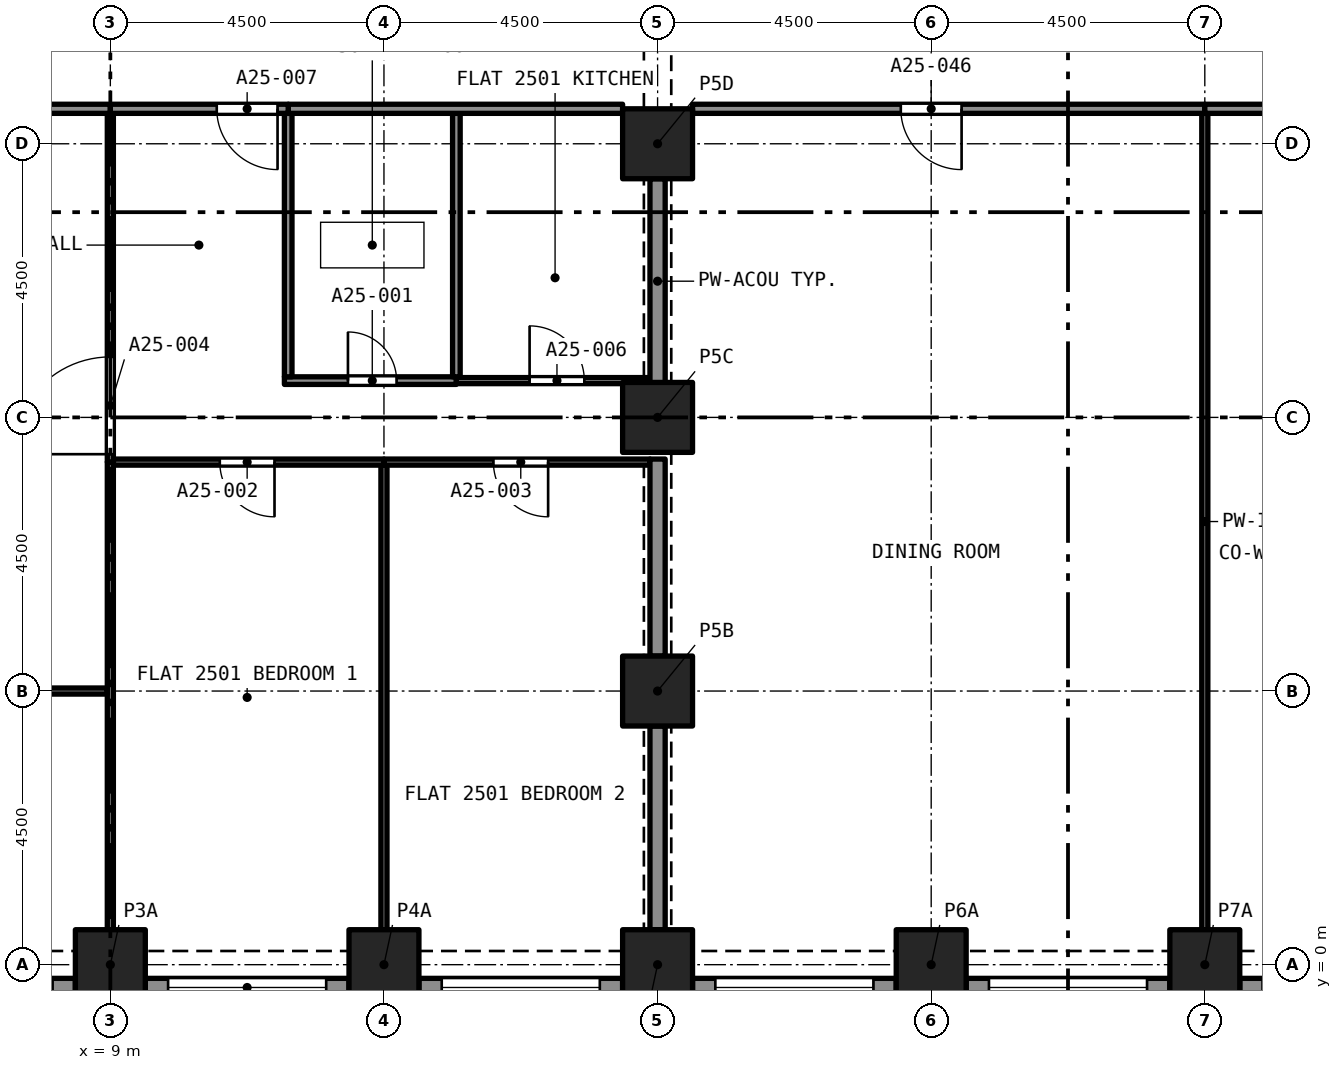
"""IFC4 building model, lengths in metres.
Left out: names, types, materials, properties, quantities, classifications, styles, units other than length and angle.
Written with IfcOpenShell. Run it as: python <this file> out.ifc"""

import sys

from ifc_helpers import new_model, si_unit, direction, frame, frame_2d, origin, origin_2d, place, context, subcontext, project, spatial, rectangle, extrude, element, fill, save


model = new_model("IFC4")
c1 = context("Model", 3, precision=1e-05, world=origin(), true_north=direction((0.0, 1.0)))
c2 = subcontext(c1, "Body", "Model", "MODEL_VIEW")
j1 = project(units=[si_unit("LENGTHUNIT", "METRE"), si_unit("PLANEANGLEUNIT", "RADIAN")], contexts=[c1])
p1 = place(None, origin())
s1 = spatial("IfcSite", under=j1, at=p1, CompositionType="ELEMENT")
p2 = place(p1, origin())
s2 = spatial("IfcBuilding", under=s1, at=p2, CompositionType="ELEMENT")
p3 = place(p2, frame((0.0, 0.0, 92.8)))
s3 = spatial("IfcBuildingStorey", under=s2, at=p3, CompositionType="ELEMENT", Elevation=92.8)
for number, where, z_axis, x_axis in (
    (1, (9.0, 0.0, 0.0), (0.0, 0.0, 1.0), (1.0, 0.0, 0.0)),
    (2, (13.5, 0.0, 0.0), (0.0, 0.0, 1.0), (1.0, 0.0, 0.0)),
    (3, (18.0, 0.0, 0.0), (0.0, 0.0, 1.0), (1.0, 0.0, 0.0)),
    (4, (22.5, 0.0, 0.0), (0.0, 0.0, 1.0), (1.0, 0.0, 0.0)),
    (5, (27.0, 0.0, 0.0), (0.0, 0.0, 1.0), (1.0, 0.0, 0.0)),
    (6, (18.0, 4.5, 0.0), (0.0, 0.0, 1.0), (1.0, 0.0, 0.0)),
    (7, (18.0, 9.0, 0.0), (0.0, 0.0, 1.0), (1.0, 0.0, 0.0)),
    (8, (18.0, 13.5, 0.0), (0.0, 0.0, 1.0), (1.0, 0.0, 0.0)),
):
    element("IfcColumn", number, at=place(p3, frame(where, z_axis=z_axis, x_axis=x_axis)), inside=s3, PredefinedType="COLUMN", context=c2, shape_type="SweptSolid", body=[
        extrude(rectangle(XDim=1.15, YDim=1.15, at=origin_2d()), origin(), (0.0, 0.0, 1.0), 3.2),
    ])
p4 = place(p3, frame((8.425, -0.375, 0.0), z_axis=(0.0, 0.0, 1.0), x_axis=(-1.0, 0.0, 0.0)))
e9 = element("IfcWall", 9, at=p4, inside=s3, PredefinedType="SOLIDWALL", context=c2, shape_type="SweptSolid", body=[
    extrude(rectangle(XDim=3.35, YDim=0.3, at=frame_2d((1.675, 0.0))), origin(), (0.0, 0.0, 1.0), 3.2),
])
p5 = place(p4, frame((0.375, 0.0, 0.45)))
e10 = element("IfcOpeningElement", 10, at=p5, cuts=e9, PredefinedType="OPENING", context=c2, shape_type="SweptSolid", body=[
    extrude(rectangle(XDim=2.6, YDim=1.95, at=frame_2d((1.3, 0.975))), frame((0.0, 0.16, 0.0), z_axis=(0.0, -1.0, 0.0), x_axis=(1.0, 0.0, 0.0)), (0.0, 0.0, 1.0), 0.32),
])
p6 = place(p3, frame((12.925, -0.375, 0.0), z_axis=(0.0, 0.0, 1.0), x_axis=(-1.0, 0.0, 0.0)))
e11 = element("IfcWall", 11, at=p6, inside=s3, PredefinedType="SOLIDWALL", context=c2, shape_type="SweptSolid", body=[
    extrude(rectangle(XDim=3.35, YDim=0.3, at=frame_2d((1.675, 0.0))), origin(), (0.0, 0.0, 1.0), 3.2),
])
p7 = place(p6, frame((0.375, 0.0, 0.45)))
e12 = element("IfcOpeningElement", 12, at=p7, cuts=e11, PredefinedType="OPENING", context=c2, shape_type="SweptSolid", body=[
    extrude(rectangle(XDim=2.6, YDim=1.95, at=frame_2d((1.3, 0.975))), frame((0.0, 0.16, 0.0), z_axis=(0.0, -1.0, 0.0), x_axis=(1.0, 0.0, 0.0)), (0.0, 0.0, 1.0), 0.32),
])
p8 = place(p3, frame((17.425, -0.375, 0.0), z_axis=(0.0, 0.0, 1.0), x_axis=(-1.0, 0.0, 0.0)))
e13 = element("IfcWall", 13, at=p8, inside=s3, PredefinedType="SOLIDWALL", context=c2, shape_type="SweptSolid", body=[
    extrude(rectangle(XDim=3.35, YDim=0.3, at=frame_2d((1.675, 0.0))), origin(), (0.0, 0.0, 1.0), 3.2),
])
p9 = place(p8, frame((0.375, 0.0, 0.45)))
e14 = element("IfcOpeningElement", 14, at=p9, cuts=e13, PredefinedType="OPENING", context=c2, shape_type="SweptSolid", body=[
    extrude(rectangle(XDim=2.6, YDim=1.95, at=frame_2d((1.3, 0.975))), frame((0.0, 0.16, 0.0), z_axis=(0.0, -1.0, 0.0), x_axis=(1.0, 0.0, 0.0)), (0.0, 0.0, 1.0), 0.32),
])
p10 = place(p3, frame((21.925, -0.375, 0.0), z_axis=(0.0, 0.0, 1.0), x_axis=(-1.0, 0.0, 0.0)))
e15 = element("IfcWall", 15, at=p10, inside=s3, PredefinedType="SOLIDWALL", context=c2, shape_type="SweptSolid", body=[
    extrude(rectangle(XDim=3.35, YDim=0.3, at=frame_2d((1.675, 0.0))), origin(), (0.0, 0.0, 1.0), 3.2),
])
p11 = place(p10, frame((0.375, 0.0, 0.45)))
e16 = element("IfcOpeningElement", 16, at=p11, cuts=e15, PredefinedType="OPENING", context=c2, shape_type="SweptSolid", body=[
    extrude(rectangle(XDim=2.6, YDim=1.95, at=frame_2d((1.3, 0.975))), frame((0.0, 0.16, 0.0), z_axis=(0.0, -1.0, 0.0), x_axis=(1.0, 0.0, 0.0)), (0.0, 0.0, 1.0), 0.32),
])
p12 = place(p3, frame((26.425, -0.375, 0.0), z_axis=(0.0, 0.0, 1.0), x_axis=(-1.0, 0.0, 0.0)))
e17 = element("IfcWall", 17, at=p12, inside=s3, PredefinedType="SOLIDWALL", context=c2, shape_type="SweptSolid", body=[
    extrude(rectangle(XDim=3.35, YDim=0.3, at=frame_2d((1.675, 0.0))), origin(), (0.0, 0.0, 1.0), 3.2),
])
p13 = place(p12, frame((0.375, 0.0, 0.45)))
e18 = element("IfcOpeningElement", 18, at=p13, cuts=e17, PredefinedType="OPENING", context=c2, shape_type="SweptSolid", body=[
    extrude(rectangle(XDim=2.6, YDim=1.95, at=frame_2d((1.3, 0.975))), frame((0.0, 0.16, 0.0), z_axis=(0.0, -1.0, 0.0), x_axis=(1.0, 0.0, 0.0)), (0.0, 0.0, 1.0), 0.32),
])
p14 = place(p3, frame((30.925, -0.375, 0.0), z_axis=(0.0, 0.0, 1.0), x_axis=(-1.0, 0.0, 0.0)))
e19 = element("IfcWall", 19, at=p14, inside=s3, PredefinedType="SOLIDWALL", context=c2, shape_type="SweptSolid", body=[
    extrude(rectangle(XDim=3.35, YDim=0.3, at=frame_2d((1.675, 0.0))), origin(), (0.0, 0.0, 1.0), 3.2),
])
p15 = place(p14, frame((0.375, 0.0, 0.45)))
e20 = element("IfcOpeningElement", 20, at=p15, cuts=e19, PredefinedType="OPENING", context=c2, shape_type="SweptSolid", body=[
    extrude(rectangle(XDim=2.6, YDim=1.95, at=frame_2d((1.3, 0.975))), frame((0.0, 0.16, 0.0), z_axis=(0.0, -1.0, 0.0), x_axis=(1.0, 0.0, 0.0)), (0.0, 0.0, 1.0), 0.32),
])
p16 = place(p3, frame((11.863, 9.605, 0.0), z_axis=(0.0, 0.0, 1.0), x_axis=(1.0, 0.0, 0.0)))
e21 = element("IfcWall", 21, at=p16, inside=s3, PredefinedType="PARTITIONING", context=c2, shape_type="SweptSolid", body=[
    extrude(rectangle(XDim=2.828, YDim=0.125, at=frame_2d((1.414, 0.0))), origin(), (0.0, 0.0, 1.0), 2.9),
])
p17 = place(p16, frame((1.045, 0.0, 0.0)))
e22 = element("IfcOpeningElement", 22, at=p17, cuts=e21, PredefinedType="OPENING", context=c2, shape_type="SweptSolid", body=[
    extrude(rectangle(XDim=0.8, YDim=2.1, at=frame_2d((0.4, 1.05))), frame((0.0, 0.073, 0.0), z_axis=(0.0, -1.0, 0.0), x_axis=(1.0, 0.0, 0.0)), (0.0, 0.0, 1.0), 0.145),
])
for number, where, z_axis, x_axis in (
    (23, (11.925, 9.667, 0.0), (0.0, 0.0, 1.0), (0.0, 1.0, 0.0)),
    (24, (14.691, 9.667, 0.0), (0.0, 0.0, 1.0), (0.0, 1.0, 0.0)),
):
    element("IfcWall", number, at=place(p3, frame(where, z_axis=z_axis, x_axis=x_axis)), inside=s3, PredefinedType="PARTITIONING", context=c2, shape_type="SweptSolid", body=[
        extrude(rectangle(XDim=4.333, YDim=0.125, at=frame_2d((2.166, 0.0))), origin(), (0.0, 0.0, 1.0), 2.9),
    ])
p18 = place(p3, frame((11.925, 14.075, 0.0), z_axis=(0.0, 0.0, 1.0), x_axis=(1.0, 0.0, 0.0)))
e25 = element("IfcWall", 25, at=p18, inside=s3, PredefinedType="PARTITIONING", context=c2, shape_type="SweptSolid", body=[
    extrude(rectangle(XDim=5.5, YDim=0.15, at=frame_2d((2.75, 0.0))), origin(), (0.0, 0.0, 1.0), 2.9),
])
p19 = place(p3, frame((13.5, 0.575, 0.0), z_axis=(0.0, 0.0, 1.0), x_axis=(0.0, 1.0, 0.0)))
e26 = element("IfcWall", 26, at=p19, inside=s3, PredefinedType="PARTITIONING", context=c2, shape_type="SweptSolid", body=[
    extrude(rectangle(XDim=7.64, YDim=0.1, at=frame_2d((3.82, 0.0))), origin(), (0.0, 0.0, 1.0), 2.9),
])
p20 = place(p3, frame((13.5, 8.265, 0.0), z_axis=(0.0, 0.0, 1.0), x_axis=(-1.0, 0.0, 0.0)))
e27 = element("IfcWall", 27, at=p20, inside=s3, PredefinedType="PARTITIONING", context=c2, shape_type="SweptSolid", body=[
    extrude(rectangle(XDim=4.45, YDim=0.1, at=frame_2d((2.225, 0.0))), origin(), (0.0, 0.0, 1.0), 2.9),
])
p21 = place(p20, frame((1.8, 0.0, 0.0)))
e28 = element("IfcOpeningElement", 28, at=p21, cuts=e27, PredefinedType="OPENING", context=c2, shape_type="SweptSolid", body=[
    extrude(rectangle(XDim=0.9, YDim=2.1, at=frame_2d((0.45, 1.05))), frame((0.0, 0.06, 0.0), z_axis=(0.0, -1.0, 0.0), x_axis=(1.0, 0.0, 0.0)), (0.0, 0.0, 1.0), 0.12),
])
p22 = place(p3, frame((9.0, 0.575, 0.0), z_axis=(0.0, 0.0, 1.0), x_axis=(0.0, 1.0, 0.0)))
e29 = element("IfcWall", 29, at=p22, inside=s3, PredefinedType="PARTITIONING", context=c2, shape_type="SweptSolid", body=[
    extrude(rectangle(XDim=7.69, YDim=0.1, at=frame_2d((3.845, 0.0))), origin(), (0.0, 0.0, 1.0), 2.9),
])
p23 = place(p3, frame((17.875, 8.265, 0.0), z_axis=(0.0, 0.0, 1.0), x_axis=(-1.0, 0.0, 0.0)))
e30 = element("IfcWall", 30, at=p23, inside=s3, PredefinedType="PARTITIONING", context=c2, shape_type="SweptSolid", body=[
    extrude(rectangle(XDim=4.375, YDim=0.1, at=frame_2d((2.188, 0.0))), origin(), (0.0, 0.0, 1.0), 2.9),
])
p24 = place(p23, frame((1.675, 0.0, 0.0)))
e31 = element("IfcOpeningElement", 31, at=p24, cuts=e30, PredefinedType="OPENING", context=c2, shape_type="SweptSolid", body=[
    extrude(rectangle(XDim=0.9, YDim=2.1, at=frame_2d((0.45, 1.05))), frame((0.0, 0.06, 0.0), z_axis=(0.0, -1.0, 0.0), x_axis=(1.0, 0.0, 0.0)), (0.0, 0.0, 1.0), 0.12),
])
p25 = place(p3, frame((18.0, 5.075, 0.0), z_axis=(0.0, 0.0, 1.0), x_axis=(0.0, 1.0, 0.0)))
e32 = element("IfcWall", 32, at=p25, inside=s3, PredefinedType="PARTITIONING", context=c2, shape_type="SweptSolid", body=[
    extrude(rectangle(XDim=3.24, YDim=0.25, at=frame_2d((1.62, 0.0))), origin(), (0.0, 0.0, 1.0), 2.38),
])
p26 = place(p3, frame((18.0, 0.575, 0.0), z_axis=(0.0, 0.0, 1.0), x_axis=(0.0, 1.0, 0.0)))
e33 = element("IfcWall", 33, at=p26, inside=s3, PredefinedType="PARTITIONING", context=c2, shape_type="SweptSolid", body=[
    extrude(rectangle(XDim=3.35, YDim=0.25, at=frame_2d((1.675, 0.0))), origin(), (0.0, 0.0, 1.0), 2.38),
])
p27 = place(p3, frame((9.0, 8.265, 0.0), z_axis=(0.0, 0.0, 1.0), x_axis=(0.0, 1.0, 0.0)))
e34 = element("IfcWall", 34, at=p27, inside=s3, PredefinedType="PARTITIONING", context=c2, shape_type="SweptSolid", body=[
    extrude(rectangle(XDim=5.735, YDim=0.1, at=frame_2d((2.868, 0.0))), origin(), (0.0, 0.0, 1.0), 2.9),
])
p28 = place(p27, frame((0.13, 0.0, 0.0)))
e35 = element("IfcOpeningElement", 35, at=p28, cuts=e34, PredefinedType="OPENING", context=c2, shape_type="SweptSolid", body=[
    extrude(rectangle(XDim=1.6, YDim=2.1, at=frame_2d((0.8, 1.05))), frame((0.0, 0.06, 0.0), z_axis=(0.0, -1.0, 0.0), x_axis=(1.0, 0.0, 0.0)), (0.0, 0.0, 1.0), 0.12),
])
p29 = place(p3, frame((0.622, 4.5, 0.0), z_axis=(0.0, 0.0, 1.0), x_axis=(1.0, 0.0, 0.0)))
e36 = element("IfcWall", 36, at=p29, inside=s3, PredefinedType="PARTITIONING", context=c2, shape_type="SweptSolid", body=[
    extrude(rectangle(XDim=8.328, YDim=0.1, at=frame_2d((4.164, 0.0))), origin(), (0.0, 0.0, 1.0), 2.9),
])
p30 = place(p29, frame((3.365, 0.0, 0.0)))
e37 = element("IfcOpeningElement", 37, at=p30, cuts=e36, PredefinedType="OPENING", context=c2, shape_type="SweptSolid", body=[
    extrude(rectangle(XDim=1.6, YDim=2.1, at=frame_2d((0.8, 1.05))), frame((0.0, 0.06, 0.0), z_axis=(0.0, -1.0, 0.0), x_axis=(1.0, 0.0, 0.0)), (0.0, 0.0, 1.0), 0.12),
])
p31 = place(p3, frame((0.575, 14.075, 0.0), z_axis=(0.0, 0.0, 1.0), x_axis=(1.0, 0.0, 0.0)))
e38 = element("IfcWall", 38, at=p31, inside=s3, PredefinedType="PARTITIONING", context=c2, shape_type="SweptSolid", body=[
    extrude(rectangle(XDim=8.425, YDim=0.15, at=frame_2d((4.212, 0.0))), origin(), (0.0, 0.0, 1.0), 2.9),
])
p32 = place(p3, frame((14.69, 9.605, 0.0), z_axis=(0.0, 0.0, 1.0), x_axis=(1.0, 0.0, 0.0)))
e39 = element("IfcWall", 39, at=p32, inside=s3, PredefinedType="PARTITIONING", context=c2, shape_type="SweptSolid", body=[
    extrude(rectangle(XDim=3.185, YDim=0.1, at=frame_2d((1.592, 0.0))), origin(), (0.0, 0.0, 1.0), 2.9),
])
p33 = place(p32, frame((1.205, 0.0, 0.0)))
e40 = element("IfcOpeningElement", 40, at=p33, cuts=e39, PredefinedType="OPENING", context=c2, shape_type="SweptSolid", body=[
    extrude(rectangle(XDim=0.9, YDim=2.1, at=frame_2d((0.45, 1.05))), frame((0.0, 0.06, 0.0), z_axis=(0.0, -1.0, 0.0), x_axis=(1.0, 0.0, 0.0)), (0.0, 0.0, 1.0), 0.12),
])
p34 = place(p3, frame((11.925, 14.075, 0.0), z_axis=(0.0, 0.0, 1.0), x_axis=(-1.0, 0.0, 0.0)))
e41 = element("IfcWall", 41, at=p34, inside=s3, PredefinedType="PARTITIONING", context=c2, shape_type="SweptSolid", body=[
    extrude(rectangle(XDim=2.925, YDim=0.15, at=frame_2d((1.462, 0.0))), origin(), (0.0, 0.0, 1.0), 2.9),
])
p35 = place(p34, frame((0.175, 0.0, 0.0)))
e42 = element("IfcOpeningElement", 42, at=p35, cuts=e41, PredefinedType="OPENING", context=c2, shape_type="SweptSolid", body=[
    extrude(rectangle(XDim=1.0, YDim=2.1, at=frame_2d((0.5, 1.05))), frame((0.0, 0.085, 0.0), z_axis=(0.0, -1.0, 0.0), x_axis=(1.0, 0.0, 0.0)), (0.0, 0.0, 1.0), 0.17),
])
p36 = place(p3, frame((18.0, 9.555, 0.0), z_axis=(0.0, 0.0, 1.0), x_axis=(0.0, 1.0, 0.0)))
e43 = element("IfcWall", 43, at=p36, inside=s3, PredefinedType="PARTITIONING", context=c2, shape_type="SweptSolid", body=[
    extrude(rectangle(XDim=3.37, YDim=0.25, at=frame_2d((1.685, 0.0))), origin(), (0.0, 0.0, 1.0), 2.38),
])
p37 = place(p3, frame((27.0, 0.575, 0.0), z_axis=(0.0, 0.0, 1.0), x_axis=(0.0, 1.0, 0.0)))
e44 = element("IfcWall", 44, at=p37, inside=s3, PredefinedType="PARTITIONING", context=c2, shape_type="SweptSolid", body=[
    extrude(rectangle(XDim=13.425, YDim=0.1, at=frame_2d((6.712, 0.0))), origin(), (0.0, 0.0, 1.0), 2.75),
])
p38 = place(p3, frame((27.0, 14.075, 0.0), z_axis=(0.0, 0.0, 1.0), x_axis=(-1.0, 0.0, 0.0)))
e45 = element("IfcWall", 45, at=p38, inside=s3, PredefinedType="PARTITIONING", context=c2, shape_type="SweptSolid", body=[
    extrude(rectangle(XDim=8.425, YDim=0.15, at=frame_2d((4.212, 0.0))), origin(), (0.0, 0.0, 1.0), 2.75),
])
p39 = place(p38, frame((4.0, 0.0, 0.0)))
e46 = element("IfcOpeningElement", 46, at=p39, cuts=e45, PredefinedType="OPENING", context=c2, shape_type="SweptSolid", body=[
    extrude(rectangle(XDim=1.0, YDim=2.1, at=frame_2d((0.5, 1.05))), frame((0.0, 0.085, 0.0), z_axis=(0.0, -1.0, 0.0), x_axis=(1.0, 0.0, 0.0)), (0.0, 0.0, 1.0), 0.17),
])
p40 = place(p3, frame((30.925, 14.075, 0.0), z_axis=(0.0, 0.0, 1.0), x_axis=(-1.0, 0.0, 0.0)))
e47 = element("IfcWall", 47, at=p40, inside=s3, PredefinedType="PARTITIONING", context=c2, shape_type="SweptSolid", body=[
    extrude(rectangle(XDim=3.925, YDim=0.15, at=frame_2d((1.962, 0.0))), origin(), (0.0, 0.0, 1.0), 2.75),
])
p41 = place(p40, frame((1.175, 0.0, 0.0)))
e48 = element("IfcOpeningElement", 48, at=p41, cuts=e47, PredefinedType="OPENING", context=c2, shape_type="SweptSolid", body=[
    extrude(rectangle(XDim=1.0, YDim=2.1, at=frame_2d((0.5, 1.05))), frame((0.0, 0.085, 0.0), z_axis=(0.0, -1.0, 0.0), x_axis=(1.0, 0.0, 0.0)), (0.0, 0.0, 1.0), 0.17),
])
p42 = place(p7, origin())
e49 = element("IfcWindow", 49, at=p42, inside=s3, PartitioningType="SINGLE_PANEL", PredefinedType="WINDOW", context=c2, shape_type="SweptSolid", body=[
    extrude(rectangle(XDim=2.6, YDim=1.95, at=frame_2d((1.3, 0.975))), frame((0.0, 0.03, 0.0), z_axis=(0.0, -1.0, 0.0), x_axis=(1.0, 0.0, 0.0)), (0.0, 0.0, 1.0), 0.06),
])
fill(e12, e49)
p43 = place(p9, origin())
e50 = element("IfcWindow", 50, at=p43, inside=s3, PartitioningType="SINGLE_PANEL", PredefinedType="WINDOW", context=c2, shape_type="SweptSolid", body=[
    extrude(rectangle(XDim=2.6, YDim=1.95, at=frame_2d((1.3, 0.975))), frame((0.0, 0.03, 0.0), z_axis=(0.0, -1.0, 0.0), x_axis=(1.0, 0.0, 0.0)), (0.0, 0.0, 1.0), 0.06),
])
fill(e14, e50)
p44 = place(p11, origin())
e51 = element("IfcWindow", 51, at=p44, inside=s3, PartitioningType="SINGLE_PANEL", PredefinedType="WINDOW", context=c2, shape_type="SweptSolid", body=[
    extrude(rectangle(XDim=2.6, YDim=1.95, at=frame_2d((1.3, 0.975))), frame((0.0, 0.03, 0.0), z_axis=(0.0, -1.0, 0.0), x_axis=(1.0, 0.0, 0.0)), (0.0, 0.0, 1.0), 0.06),
])
fill(e16, e51)
p45 = place(p13, origin())
e52 = element("IfcWindow", 52, at=p45, inside=s3, PartitioningType="SINGLE_PANEL", PredefinedType="WINDOW", context=c2, shape_type="SweptSolid", body=[
    extrude(rectangle(XDim=2.6, YDim=1.95, at=frame_2d((1.3, 0.975))), frame((0.0, 0.03, 0.0), z_axis=(0.0, -1.0, 0.0), x_axis=(1.0, 0.0, 0.0)), (0.0, 0.0, 1.0), 0.06),
])
fill(e18, e52)
p46 = place(p17, origin())
e53 = element("IfcDoor", 53, at=p46, inside=s3, OperationType="SINGLE_SWING_RIGHT", PredefinedType="DOOR", context=c2, shape_type="SweptSolid", body=[
    extrude(rectangle(XDim=0.8, YDim=2.1, at=frame_2d((0.4, 1.05))), frame((0.0, 0.025, 0.0), z_axis=(0.0, -1.0, 0.0), x_axis=(1.0, 0.0, 0.0)), (0.0, 0.0, 1.0), 0.05),
])
fill(e22, e53)
p47 = place(p21, origin())
e54 = element("IfcDoor", 54, at=p47, inside=s3, OperationType="SINGLE_SWING_RIGHT", PredefinedType="DOOR", context=c2, shape_type="SweptSolid", body=[
    extrude(rectangle(XDim=0.9, YDim=2.1, at=frame_2d((0.45, 1.05))), frame((0.0, 0.025, 0.0), z_axis=(0.0, -1.0, 0.0), x_axis=(1.0, 0.0, 0.0)), (0.0, 0.0, 1.0), 0.05),
])
fill(e28, e54)
p48 = place(p24, origin())
e55 = element("IfcDoor", 55, at=p48, inside=s3, OperationType="SINGLE_SWING_LEFT", PredefinedType="DOOR", context=c2, shape_type="SweptSolid", body=[
    extrude(rectangle(XDim=0.9, YDim=2.1, at=frame_2d((0.45, 1.05))), frame((0.0, 0.025, 0.0), z_axis=(0.0, -1.0, 0.0), x_axis=(1.0, 0.0, 0.0)), (0.0, 0.0, 1.0), 0.05),
])
fill(e31, e55)
p49 = place(p28, origin())
e56 = element("IfcDoor", 56, at=p49, inside=s3, OperationType="SINGLE_SWING_LEFT", PredefinedType="DOOR", context=c2, shape_type="SweptSolid", body=[
    extrude(rectangle(XDim=1.6, YDim=2.1, at=frame_2d((0.8, 1.05))), frame((0.0, 0.025, 0.0), z_axis=(0.0, -1.0, 0.0), x_axis=(1.0, 0.0, 0.0)), (0.0, 0.0, 1.0), 0.05),
])
fill(e35, e56)
p50 = place(p33, origin())
e57 = element("IfcDoor", 57, at=p50, inside=s3, OperationType="SINGLE_SWING_RIGHT", PredefinedType="DOOR", context=c2, shape_type="SweptSolid", body=[
    extrude(rectangle(XDim=0.9, YDim=2.1, at=frame_2d((0.45, 1.05))), frame((0.0, 0.025, 0.0), z_axis=(0.0, -1.0, 0.0), x_axis=(1.0, 0.0, 0.0)), (0.0, 0.0, 1.0), 0.05),
])
fill(e40, e57)
p51 = place(p35, origin())
e58 = element("IfcDoor", 58, at=p51, inside=s3, OperationType="SINGLE_SWING_LEFT", PredefinedType="DOOR", context=c2, shape_type="SweptSolid", body=[
    extrude(rectangle(XDim=1.0, YDim=2.1, at=frame_2d((0.5, 1.05))), frame((0.0, 0.025, 0.0), z_axis=(0.0, -1.0, 0.0), x_axis=(1.0, 0.0, 0.0)), (0.0, 0.0, 1.0), 0.05),
])
fill(e42, e58)
p52 = place(p39, origin())
e59 = element("IfcDoor", 59, at=p52, inside=s3, OperationType="SINGLE_SWING_RIGHT", PredefinedType="DOOR", context=c2, shape_type="SweptSolid", body=[
    extrude(rectangle(XDim=1.0, YDim=2.1, at=frame_2d((0.5, 1.05))), frame((0.0, 0.025, 0.0), z_axis=(0.0, -1.0, 0.0), x_axis=(1.0, 0.0, 0.0)), (0.0, 0.0, 1.0), 0.05),
])
fill(e46, e59)
save(model, sys.argv[1])
